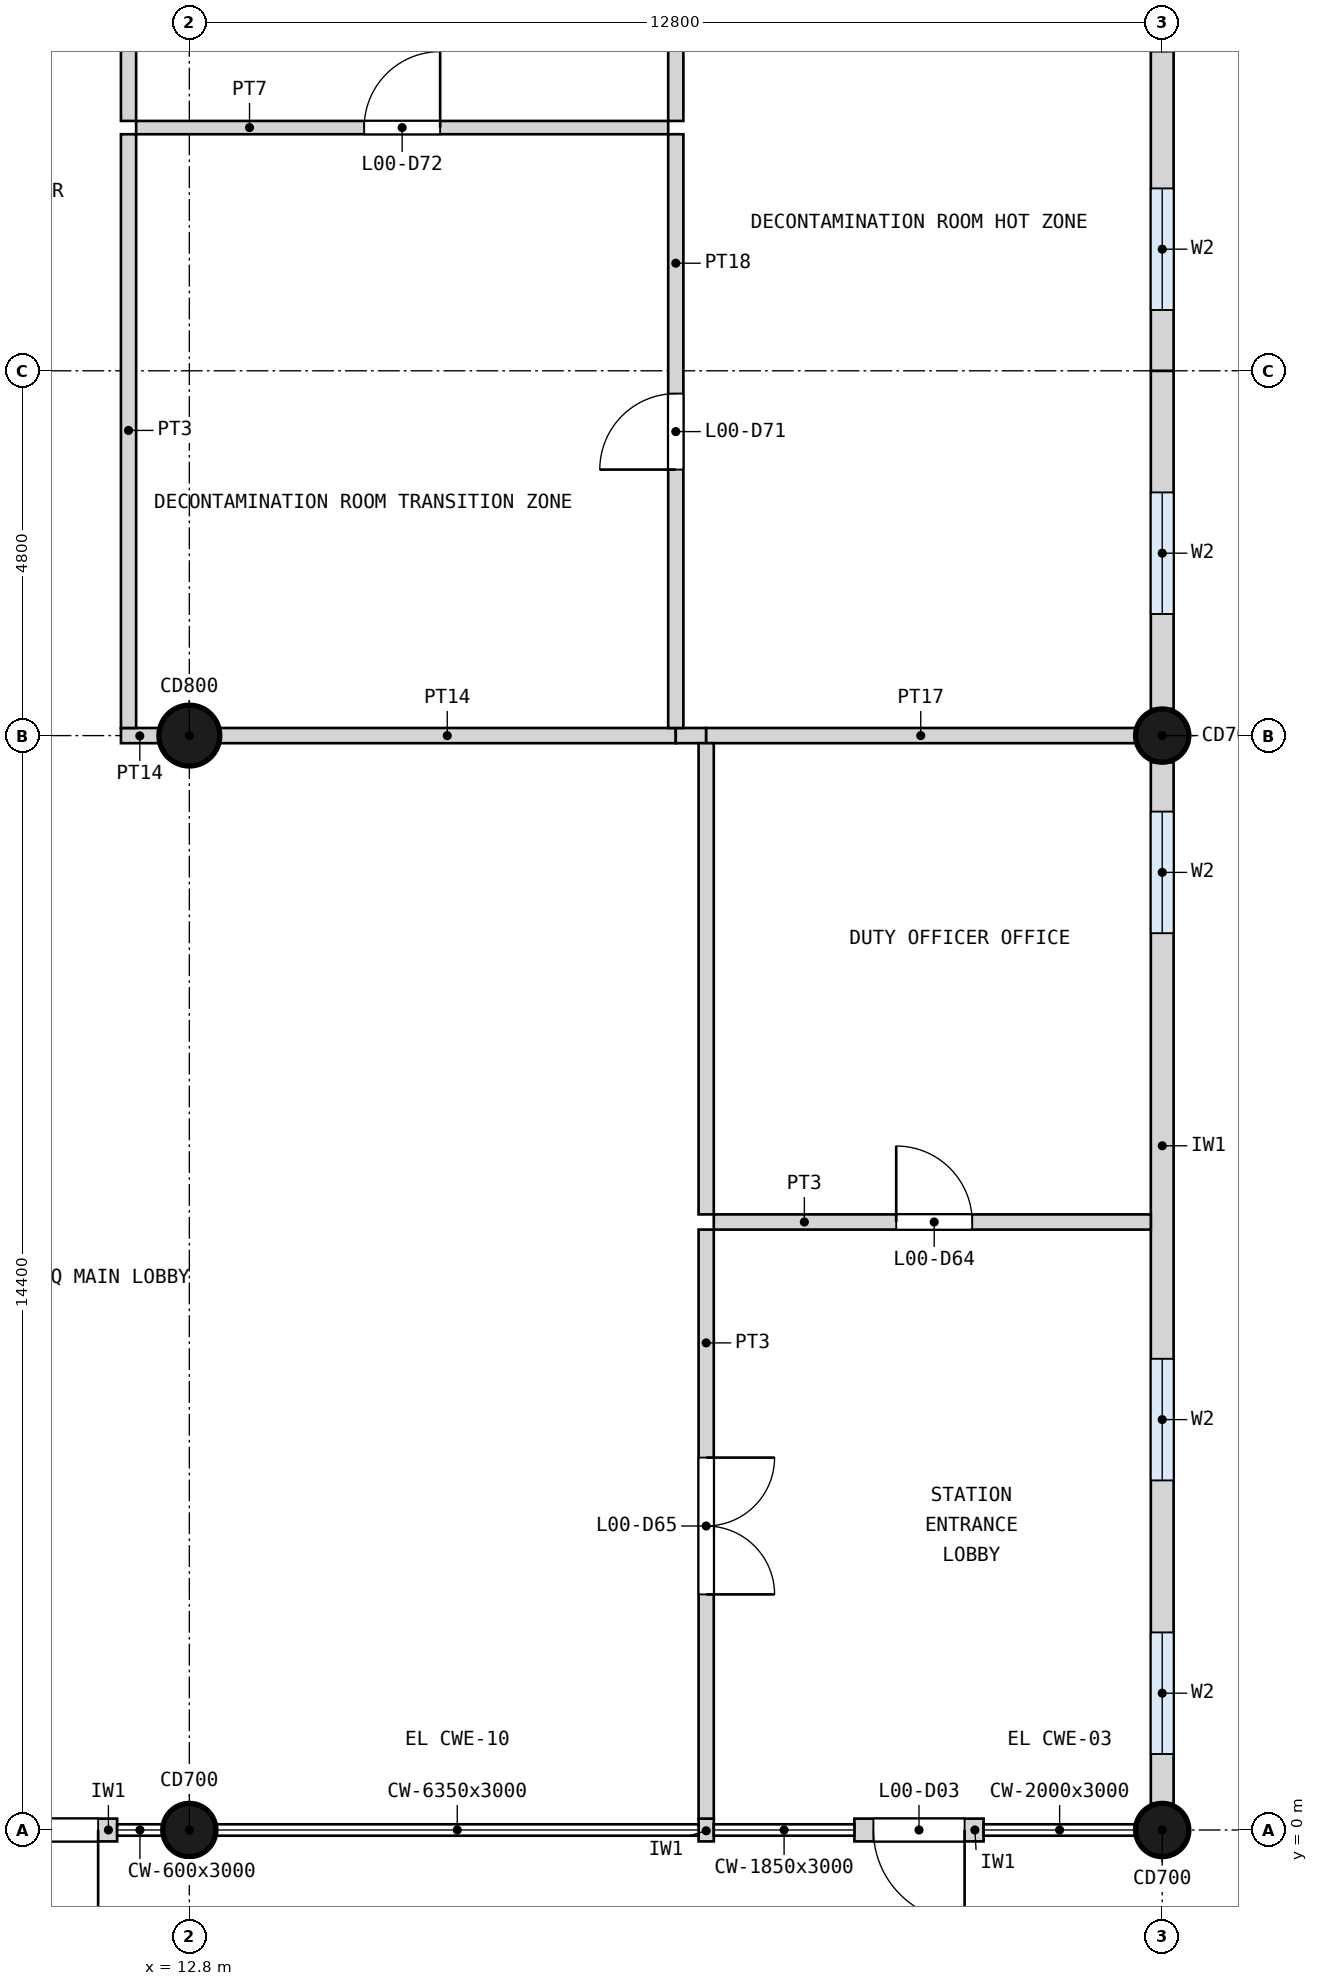
"""IFC4 building model, lengths in metres.
Left out: names, types, materials, properties, quantities, classifications, styles, units other than length and angle.
Written with IfcOpenShell. Run it as: python <this file> out.ifc"""

import sys

from ifc_helpers import new_model, si_unit, direction, frame, frame_2d, origin, origin_2d, place, context, subcontext, project, spatial, rectangle, circle, extrude, element, fill, save


model = new_model("IFC4")
c1 = context("Model", 3, precision=1e-05, world=origin(), true_north=direction((0.0, 1.0)))
c2 = subcontext(c1, "Body", "Model", "MODEL_VIEW")
j1 = project(units=[si_unit("LENGTHUNIT", "METRE"), si_unit("PLANEANGLEUNIT", "RADIAN")], contexts=[c1])
p1 = place(None, origin())
s1 = spatial("IfcSite", under=j1, at=p1, CompositionType="ELEMENT")
p2 = place(p1, origin())
s2 = spatial("IfcBuilding", under=s1, at=p2, CompositionType="ELEMENT")
p3 = place(p2, origin())
s3 = spatial("IfcBuildingStorey", under=s2, at=p3, CompositionType="ELEMENT", Elevation=0.0)
p4 = place(p3, frame((12.8, 0.0, 0.0), z_axis=(0.0, 0.0, 1.0), x_axis=(1.0, 0.0, 0.0)))
e1 = element("IfcColumn", 1, at=p4, inside=s3, PredefinedType="COLUMN", context=c2, shape_type="SweptSolid", body=[
    extrude(circle(Radius=0.35, at=origin_2d()), origin(), (0.0, 0.0, 1.0), 4.2),
])
p5 = place(p3, frame((12.8, 14.4, 0.0), z_axis=(0.0, 0.0, 1.0), x_axis=(1.0, 0.0, 0.0)))
e2 = element("IfcColumn", 2, at=p5, inside=s3, PredefinedType="COLUMN", context=c2, shape_type="SweptSolid", body=[
    extrude(circle(Radius=0.4, at=origin_2d()), origin(), (0.0, 0.0, 1.0), 4.2),
])
for number, where, z_axis, x_axis in (
    (3, (25.6, 0.0, 0.0), (0.0, 0.0, 1.0), (1.0, 0.0, 0.0)),
    (4, (25.6, 14.4, 0.0), (0.0, 0.0, 1.0), (1.0, 0.0, 0.0)),
):
    element("IfcColumn", number, at=place(p3, frame(where, z_axis=z_axis, x_axis=x_axis)), inside=s3, PredefinedType="COLUMN", context=c2, shape_type="SweptSolid", body=[
        extrude(circle(Radius=0.35, at=origin_2d()), origin(), (0.0, 0.0, 1.0), 4.2),
    ])
p6 = place(p3, frame((8.95, 0.0, 0.0), z_axis=(0.0, 0.0, 1.0), x_axis=(1.0, 0.0, 0.0)))
e5 = element("IfcWall", 5, at=p6, inside=s3, PredefinedType="SOLIDWALL", context=c2, shape_type="SweptSolid", body=[
    extrude(rectangle(XDim=2.9, YDim=0.3, at=frame_2d((1.45, 0.0))), origin(), (0.0, 0.0, 1.0), 3.0),
])
p7 = place(p6, frame((0.25, 0.0, 0.0)))
e6 = element("IfcOpeningElement", 6, at=p7, cuts=e5, PredefinedType="OPENING", context=c2, shape_type="SweptSolid", body=[
    extrude(rectangle(XDim=2.4, YDim=2.4, at=frame_2d((1.2, 1.2))), frame((0.0, 0.16, 0.0), z_axis=(0.0, -1.0, 0.0), x_axis=(1.0, 0.0, 0.0)), (0.0, 0.0, 1.0), 0.32),
])
p8 = place(p3, frame((19.5, 0.0, 0.0), z_axis=(0.0, 0.0, 1.0), x_axis=(1.0, 0.0, 0.0)))
e7 = element("IfcWall", 7, at=p8, inside=s3, PredefinedType="SOLIDWALL", context=c2, shape_type="SweptSolid", body=[
    extrude(rectangle(XDim=0.2, YDim=0.3, at=frame_2d((0.1, 0.0))), origin(), (0.0, 0.0, 1.0), 3.0),
])
p9 = place(p3, frame((21.55, 0.0, 0.0), z_axis=(0.0, 0.0, 1.0), x_axis=(1.0, 0.0, 0.0)))
e8 = element("IfcWall", 8, at=p9, inside=s3, PredefinedType="SOLIDWALL", context=c2, shape_type="SweptSolid", body=[
    extrude(rectangle(XDim=1.7, YDim=0.3, at=frame_2d((0.85, 0.0))), origin(), (0.0, 0.0, 1.0), 3.0),
])
p10 = place(p9, frame((0.25, 0.0, 0.0)))
e9 = element("IfcOpeningElement", 9, at=p10, cuts=e8, PredefinedType="OPENING", context=c2, shape_type="SweptSolid", body=[
    extrude(rectangle(XDim=1.2, YDim=2.4, at=frame_2d((0.6, 1.2))), frame((0.0, 0.16, 0.0), z_axis=(0.0, -1.0, 0.0), x_axis=(1.0, 0.0, 0.0)), (0.0, 0.0, 1.0), 0.32),
])
p11 = place(p3, frame((25.6, 0.35, 0.0), z_axis=(0.0, 0.0, 1.0), x_axis=(0.0, 1.0, 0.0)))
e10 = element("IfcWall", 10, at=p11, inside=s3, PredefinedType="SOLIDWALL", context=c2, shape_type="SweptSolid", body=[
    extrude(rectangle(XDim=13.7, YDim=0.3, at=frame_2d((6.85, 0.0))), origin(), (0.0, 0.0, 1.0), 3.0),
])
p12 = place(p11, frame((0.65, 0.0, 0.3)))
e11 = element("IfcOpeningElement", 11, at=p12, cuts=e10, PredefinedType="OPENING", context=c2, shape_type="SweptSolid", body=[
    extrude(rectangle(XDim=1.6, YDim=2.4, at=frame_2d((0.8, 1.2))), frame((0.0, 0.16, 0.0), z_axis=(0.0, -1.0, 0.0), x_axis=(1.0, 0.0, 0.0)), (0.0, 0.0, 1.0), 0.32),
])
p13 = place(p11, frame((4.25, 0.0, 0.3)))
e12 = element("IfcOpeningElement", 12, at=p13, cuts=e10, PredefinedType="OPENING", context=c2, shape_type="SweptSolid", body=[
    extrude(rectangle(XDim=1.6, YDim=2.4, at=frame_2d((0.8, 1.2))), frame((0.0, 0.16, 0.0), z_axis=(0.0, -1.0, 0.0), x_axis=(1.0, 0.0, 0.0)), (0.0, 0.0, 1.0), 0.32),
])
p14 = place(p11, frame((11.45, 0.0, 0.3)))
e13 = element("IfcOpeningElement", 13, at=p14, cuts=e10, PredefinedType="OPENING", context=c2, shape_type="SweptSolid", body=[
    extrude(rectangle(XDim=1.6, YDim=2.4, at=frame_2d((0.8, 1.2))), frame((0.0, 0.16, 0.0), z_axis=(0.0, -1.0, 0.0), x_axis=(1.0, 0.0, 0.0)), (0.0, 0.0, 1.0), 0.32),
])
p15 = place(p3, frame((25.6, 14.75, 0.0), z_axis=(0.0, 0.0, 1.0), x_axis=(0.0, 1.0, 0.0)))
e14 = element("IfcWall", 14, at=p15, inside=s3, PredefinedType="SOLIDWALL", context=c2, shape_type="SweptSolid", body=[
    extrude(rectangle(XDim=4.45, YDim=0.3, at=frame_2d((2.225, 0.0))), origin(), (0.0, 0.0, 1.0), 3.0),
])
p16 = place(p15, frame((1.25, 0.0, 0.3)))
e15 = element("IfcOpeningElement", 15, at=p16, cuts=e14, PredefinedType="OPENING", context=c2, shape_type="SweptSolid", body=[
    extrude(rectangle(XDim=1.6, YDim=2.4, at=frame_2d((0.8, 1.2))), frame((0.0, 0.16, 0.0), z_axis=(0.0, -1.0, 0.0), x_axis=(1.0, 0.0, 0.0)), (0.0, 0.0, 1.0), 0.32),
])
p17 = place(p3, frame((25.6, 19.2, 0.0), z_axis=(0.0, 0.0, 1.0), x_axis=(0.0, 1.0, 0.0)))
e16 = element("IfcWall", 16, at=p17, inside=s3, PredefinedType="SOLIDWALL", context=c2, shape_type="SweptSolid", body=[
    extrude(rectangle(XDim=9.6, YDim=0.3, at=frame_2d((4.8, 0.0))), origin(), (0.0, 0.0, 1.0), 3.0),
])
p18 = place(p17, frame((4.2, 0.0, 0.0)))
e17 = element("IfcOpeningElement", 17, at=p18, cuts=e16, PredefinedType="OPENING", context=c2, shape_type="SweptSolid", body=[
    extrude(rectangle(XDim=1.2, YDim=2.1, at=frame_2d((0.6, 1.05))), frame((0.0, 0.16, 0.0), z_axis=(0.0, -1.0, 0.0), x_axis=(1.0, 0.0, 0.0)), (0.0, 0.0, 1.0), 0.32),
])
p19 = place(p17, frame((0.8, 0.0, 0.3)))
e18 = element("IfcOpeningElement", 18, at=p19, cuts=e16, PredefinedType="OPENING", context=c2, shape_type="SweptSolid", body=[
    extrude(rectangle(XDim=1.6, YDim=2.4, at=frame_2d((0.8, 1.2))), frame((0.0, 0.16, 0.0), z_axis=(0.0, -1.0, 0.0), x_axis=(1.0, 0.0, 0.0)), (0.0, 0.0, 1.0), 0.32),
])
p20 = place(p17, frame((7.2, 0.0, 0.3)))
e19 = element("IfcOpeningElement", 19, at=p20, cuts=e16, PredefinedType="OPENING", context=c2, shape_type="SweptSolid", body=[
    extrude(rectangle(XDim=1.6, YDim=2.4, at=frame_2d((0.8, 1.2))), frame((0.0, 0.16, 0.0), z_axis=(0.0, -1.0, 0.0), x_axis=(1.0, 0.0, 0.0)), (0.0, 0.0, 1.0), 0.32),
])
p21 = place(p3, frame((19.7, 8.0, 0.0), z_axis=(0.0, 0.0, 1.0), x_axis=(1.0, 0.0, 0.0)))
e20 = element("IfcWall", 20, at=p21, inside=s3, PredefinedType="PARTITIONING", context=c2, shape_type="SweptSolid", body=[
    extrude(rectangle(XDim=5.75, YDim=0.2, at=frame_2d((2.875, 0.0))), origin(), (0.0, 0.0, 1.0), 3.9),
])
p22 = place(p21, frame((2.4, 0.0, 0.0)))
e21 = element("IfcOpeningElement", 21, at=p22, cuts=e20, PredefinedType="OPENING", context=c2, shape_type="SweptSolid", body=[
    extrude(rectangle(XDim=1.0, YDim=2.1, at=frame_2d((0.5, 1.05))), frame((0.0, 0.11, 0.0), z_axis=(0.0, -1.0, 0.0), x_axis=(1.0, 0.0, 0.0)), (0.0, 0.0, 1.0), 0.22),
])
p23 = place(p3, frame((11.9, 14.4, 0.0), z_axis=(0.0, 0.0, 1.0), x_axis=(1.0, 0.0, 0.0)))
e22 = element("IfcWall", 22, at=p23, inside=s3, PredefinedType="PARTITIONING", context=c2, shape_type="SweptSolid", body=[
    extrude(rectangle(XDim=0.5, YDim=0.2, at=frame_2d((0.25, 0.0))), origin(), (0.0, 0.0, 1.0), 3.1),
])
p24 = place(p3, frame((13.2, 14.4, 0.0), z_axis=(0.0, 0.0, 1.0), x_axis=(1.0, 0.0, 0.0)))
e23 = element("IfcWall", 23, at=p24, inside=s3, PredefinedType="PARTITIONING", context=c2, shape_type="SweptSolid", body=[
    extrude(rectangle(XDim=6.0, YDim=0.2, at=frame_2d((3.0, 0.0))), origin(), (0.0, 0.0, 1.0), 3.1),
])
p25 = place(p3, frame((19.2, 14.4, 0.0), z_axis=(0.0, 0.0, 1.0), x_axis=(1.0, 0.0, 0.0)))
e24 = element("IfcWall", 24, at=p25, inside=s3, PredefinedType="PARTITIONING", context=c2, shape_type="SweptSolid", body=[
    extrude(rectangle(XDim=0.4, YDim=0.2, at=frame_2d((0.2, 0.0))), origin(), (0.0, 0.0, 1.0), 3.1),
])
p26 = place(p3, frame((19.6, 14.4, 0.0), z_axis=(0.0, 0.0, 1.0), x_axis=(1.0, 0.0, 0.0)))
e25 = element("IfcWall", 25, at=p26, inside=s3, PredefinedType="PARTITIONING", context=c2, shape_type="SweptSolid", body=[
    extrude(rectangle(XDim=5.68, YDim=0.2, at=frame_2d((2.84, 0.0))), origin(), (0.0, 0.0, 1.0), 3.1),
])
p27 = place(p3, frame((12.1, 22.4, 0.0), z_axis=(0.0, 0.0, 1.0), x_axis=(1.0, 0.0, 0.0)))
e26 = element("IfcWall", 26, at=p27, inside=s3, PredefinedType="PARTITIONING", context=c2, shape_type="SweptSolid", body=[
    extrude(rectangle(XDim=7.0, YDim=0.175, at=frame_2d((3.5, 0.0))), origin(), (0.0, 0.0, 1.0), 3.9),
])
p28 = place(p27, frame((3.0, 0.0, 0.0)))
e27 = element("IfcOpeningElement", 27, at=p28, cuts=e26, PredefinedType="OPENING", context=c2, shape_type="SweptSolid", body=[
    extrude(rectangle(XDim=1.0, YDim=2.1, at=frame_2d((0.5, 1.05))), frame((0.0, 0.097, 0.0), z_axis=(0.0, -1.0, 0.0), x_axis=(1.0, 0.0, 0.0)), (0.0, 0.0, 1.0), 0.195),
])
p29 = place(p3, frame((12.0, 14.5, 0.0), z_axis=(0.0, 0.0, 1.0), x_axis=(0.0, 1.0, 0.0)))
e28 = element("IfcWall", 28, at=p29, inside=s3, PredefinedType="PARTITIONING", context=c2, shape_type="SweptSolid", body=[
    extrude(rectangle(XDim=7.812, YDim=0.2, at=frame_2d((3.906, 0.0))), origin(), (0.0, 0.0, 1.0), 3.9),
])
p30 = place(p3, frame((12.0, 22.488, 0.0), z_axis=(0.0, 0.0, 1.0), x_axis=(0.0, 1.0, 0.0)))
e29 = element("IfcWall", 29, at=p30, inside=s3, PredefinedType="PARTITIONING", context=c2, shape_type="SweptSolid", body=[
    extrude(rectangle(XDim=6.212, YDim=0.2, at=frame_2d((3.106, 0.0))), origin(), (0.0, 0.0, 1.0), 3.9),
])
p31 = place(p3, frame((19.2, 14.5, 0.0), z_axis=(0.0, 0.0, 1.0), x_axis=(0.0, 1.0, 0.0)))
e30 = element("IfcWall", 30, at=p31, inside=s3, PredefinedType="PARTITIONING", context=c2, shape_type="SweptSolid", body=[
    extrude(rectangle(XDim=7.812, YDim=0.2, at=frame_2d((3.906, 0.0))), origin(), (0.0, 0.0, 1.0), 3.0),
])
p32 = place(p31, frame((3.4, 0.0, 0.0)))
e31 = element("IfcOpeningElement", 31, at=p32, cuts=e30, PredefinedType="OPENING", context=c2, shape_type="SweptSolid", body=[
    extrude(rectangle(XDim=1.0, YDim=2.1, at=frame_2d((0.5, 1.05))), frame((0.0, 0.11, 0.0), z_axis=(0.0, -1.0, 0.0), x_axis=(1.0, 0.0, 0.0)), (0.0, 0.0, 1.0), 0.22),
])
p33 = place(p3, frame((19.2, 22.488, 0.0), z_axis=(0.0, 0.0, 1.0), x_axis=(0.0, 1.0, 0.0)))
e32 = element("IfcWall", 32, at=p33, inside=s3, PredefinedType="PARTITIONING", context=c2, shape_type="SweptSolid", body=[
    extrude(rectangle(XDim=6.212, YDim=0.2, at=frame_2d((3.106, 0.0))), origin(), (0.0, 0.0, 1.0), 3.0),
])
p34 = place(p3, frame((19.6, 0.15, 0.0), z_axis=(0.0, 0.0, 1.0), x_axis=(0.0, 1.0, 0.0)))
e33 = element("IfcWall", 33, at=p34, inside=s3, PredefinedType="PARTITIONING", context=c2, shape_type="SweptSolid", body=[
    extrude(rectangle(XDim=7.75, YDim=0.2, at=frame_2d((3.875, 0.0))), origin(), (0.0, 0.0, 1.0), 3.9),
])
p35 = place(p34, frame((2.95, 0.0, 0.0)))
e34 = element("IfcOpeningElement", 34, at=p35, cuts=e33, PredefinedType="OPENING", context=c2, shape_type="SweptSolid", body=[
    extrude(rectangle(XDim=1.8, YDim=2.1, at=frame_2d((0.9, 1.05))), frame((0.0, 0.11, 0.0), z_axis=(0.0, -1.0, 0.0), x_axis=(1.0, 0.0, 0.0)), (0.0, 0.0, 1.0), 0.22),
])
p36 = place(p3, frame((19.6, 8.1, 0.0), z_axis=(0.0, 0.0, 1.0), x_axis=(0.0, 1.0, 0.0)))
e35 = element("IfcWall", 35, at=p36, inside=s3, PredefinedType="PARTITIONING", context=c2, shape_type="SweptSolid", body=[
    extrude(rectangle(XDim=6.2, YDim=0.2, at=frame_2d((3.1, 0.0))), origin(), (0.0, 0.0, 1.0), 3.9),
])
p37 = place(p7, frame((2.4, 0.0, 0.0), z_axis=(0.0, 0.0, 1.0), x_axis=(-1.0, 0.0, 0.0)))
e36 = element("IfcDoor", 36, at=p37, inside=s3, OperationType="SINGLE_SWING_LEFT", PredefinedType="DOOR", context=c2, shape_type="SweptSolid", body=[
    extrude(rectangle(XDim=2.4, YDim=2.4, at=frame_2d((1.2, 1.2))), frame((0.0, 0.025, 0.0), z_axis=(0.0, -1.0, 0.0), x_axis=(1.0, 0.0, 0.0)), (0.0, 0.0, 1.0), 0.05),
])
fill(e6, e36)
p38 = place(p10, frame((1.2, 0.0, 0.0), z_axis=(0.0, 0.0, 1.0), x_axis=(-1.0, 0.0, 0.0)))
e37 = element("IfcDoor", 37, at=p38, inside=s3, OperationType="SINGLE_SWING_LEFT", PredefinedType="DOOR", context=c2, shape_type="SweptSolid", body=[
    extrude(rectangle(XDim=1.2, YDim=2.4, at=frame_2d((0.6, 1.2))), frame((0.0, 0.025, 0.0), z_axis=(0.0, -1.0, 0.0), x_axis=(1.0, 0.0, 0.0)), (0.0, 0.0, 1.0), 0.05),
])
fill(e9, e37)
p39 = place(p18, frame((1.2, 0.0, 0.0), z_axis=(0.0, 0.0, 1.0), x_axis=(-1.0, 0.0, 0.0)))
e38 = element("IfcDoor", 38, at=p39, inside=s3, OperationType="SINGLE_SWING_LEFT", PredefinedType="DOOR", context=c2, shape_type="SweptSolid", body=[
    extrude(rectangle(XDim=1.2, YDim=2.1, at=frame_2d((0.6, 1.05))), frame((0.0, 0.025, 0.0), z_axis=(0.0, -1.0, 0.0), x_axis=(1.0, 0.0, 0.0)), (0.0, 0.0, 1.0), 0.05),
])
fill(e17, e38)
p40 = place(p22, origin())
e39 = element("IfcDoor", 39, at=p40, inside=s3, OperationType="SINGLE_SWING_LEFT", PredefinedType="DOOR", context=c2, shape_type="SweptSolid", body=[
    extrude(rectangle(XDim=1.0, YDim=2.1, at=frame_2d((0.5, 1.05))), frame((0.0, 0.025, 0.0), z_axis=(0.0, -1.0, 0.0), x_axis=(1.0, 0.0, 0.0)), (0.0, 0.0, 1.0), 0.05),
])
fill(e21, e39)
p41 = place(p35, frame((1.8, 0.0, 0.0), z_axis=(0.0, 0.0, 1.0), x_axis=(-1.0, 0.0, 0.0)))
e40 = element("IfcDoor", 40, at=p41, inside=s3, OperationType="DOUBLE_DOOR_SINGLE_SWING", PredefinedType="DOOR", context=c2, shape_type="SweptSolid", body=[
    extrude(rectangle(XDim=1.8, YDim=2.1, at=frame_2d((0.9, 1.05))), frame((0.0, 0.025, 0.0), z_axis=(0.0, -1.0, 0.0), x_axis=(1.0, 0.0, 0.0)), (0.0, 0.0, 1.0), 0.05),
])
fill(e34, e40)
p42 = place(p32, origin())
e41 = element("IfcDoor", 41, at=p42, inside=s3, OperationType="SINGLE_SWING_LEFT", PredefinedType="DOOR", context=c2, shape_type="SweptSolid", body=[
    extrude(rectangle(XDim=1.0, YDim=2.1, at=frame_2d((0.5, 1.05))), frame((0.0, 0.025, 0.0), z_axis=(0.0, -1.0, 0.0), x_axis=(1.0, 0.0, 0.0)), (0.0, 0.0, 1.0), 0.05),
])
fill(e31, e41)
p43 = place(p28, origin())
e42 = element("IfcDoor", 42, at=p43, inside=s3, OperationType="SINGLE_SWING_RIGHT", PredefinedType="DOOR", context=c2, shape_type="SweptSolid", body=[
    extrude(rectangle(XDim=1.0, YDim=2.1, at=frame_2d((0.5, 1.05))), frame((0.0, 0.025, 0.0), z_axis=(0.0, -1.0, 0.0), x_axis=(1.0, 0.0, 0.0)), (0.0, 0.0, 1.0), 0.05),
])
fill(e27, e42)
p44 = place(p12, origin())
e43 = element("IfcWindow", 43, at=p44, inside=s3, PartitioningType="SINGLE_PANEL", PredefinedType="WINDOW", context=c2, shape_type="SweptSolid", body=[
    extrude(rectangle(XDim=1.6, YDim=2.4, at=frame_2d((0.8, 1.2))), frame((0.0, 0.03, 0.0), z_axis=(0.0, -1.0, 0.0), x_axis=(1.0, 0.0, 0.0)), (0.0, 0.0, 1.0), 0.06),
])
fill(e11, e43)
p45 = place(p13, origin())
e44 = element("IfcWindow", 44, at=p45, inside=s3, PartitioningType="SINGLE_PANEL", PredefinedType="WINDOW", context=c2, shape_type="SweptSolid", body=[
    extrude(rectangle(XDim=1.6, YDim=2.4, at=frame_2d((0.8, 1.2))), frame((0.0, 0.03, 0.0), z_axis=(0.0, -1.0, 0.0), x_axis=(1.0, 0.0, 0.0)), (0.0, 0.0, 1.0), 0.06),
])
fill(e12, e44)
p46 = place(p14, origin())
e45 = element("IfcWindow", 45, at=p46, inside=s3, PartitioningType="SINGLE_PANEL", PredefinedType="WINDOW", context=c2, shape_type="SweptSolid", body=[
    extrude(rectangle(XDim=1.6, YDim=2.4, at=frame_2d((0.8, 1.2))), frame((0.0, 0.03, 0.0), z_axis=(0.0, -1.0, 0.0), x_axis=(1.0, 0.0, 0.0)), (0.0, 0.0, 1.0), 0.06),
])
fill(e13, e45)
p47 = place(p16, origin())
e46 = element("IfcWindow", 46, at=p47, inside=s3, PartitioningType="SINGLE_PANEL", PredefinedType="WINDOW", context=c2, shape_type="SweptSolid", body=[
    extrude(rectangle(XDim=1.6, YDim=2.4, at=frame_2d((0.8, 1.2))), frame((0.0, 0.03, 0.0), z_axis=(0.0, -1.0, 0.0), x_axis=(1.0, 0.0, 0.0)), (0.0, 0.0, 1.0), 0.06),
])
fill(e15, e46)
p48 = place(p19, origin())
e47 = element("IfcWindow", 47, at=p48, inside=s3, PartitioningType="SINGLE_PANEL", PredefinedType="WINDOW", context=c2, shape_type="SweptSolid", body=[
    extrude(rectangle(XDim=1.6, YDim=2.4, at=frame_2d((0.8, 1.2))), frame((0.0, 0.03, 0.0), z_axis=(0.0, -1.0, 0.0), x_axis=(1.0, 0.0, 0.0)), (0.0, 0.0, 1.0), 0.06),
])
fill(e18, e47)
save(model, sys.argv[1])
